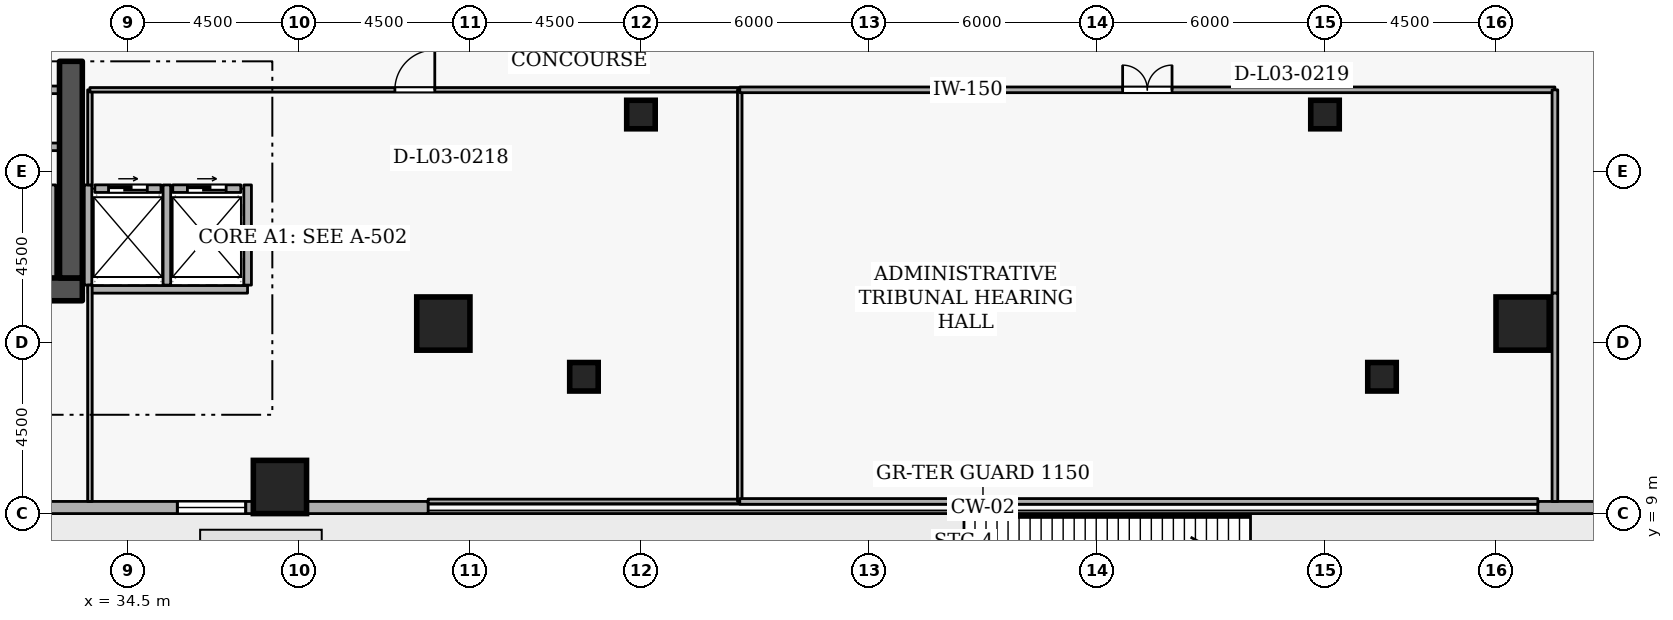
"""IFC4 building model, lengths in metres.
Left out: names, types, materials, properties, quantities, classifications, styles, units other than length and angle.
Written with IfcOpenShell. Run it as: python <this file> out.ifc"""

import sys

from ifc_helpers import new_model, si_unit, direction, frame, frame_2d, origin, origin_2d, place, context, subcontext, project, spatial, rectangle, extrude, element, fill, save


model = new_model("IFC4")
c1 = context("Model", 3, precision=1e-05, world=origin(), true_north=direction((0.0, 1.0)))
c2 = subcontext(c1, "Body", "Model", "MODEL_VIEW")
j1 = project(units=[si_unit("LENGTHUNIT", "METRE"), si_unit("PLANEANGLEUNIT", "RADIAN")], contexts=[c1])
p1 = place(None, origin())
s1 = spatial("IfcSite", under=j1, at=p1, CompositionType="ELEMENT")
p2 = place(p1, origin())
s2 = spatial("IfcBuilding", under=s1, at=p2, CompositionType="ELEMENT")
p3 = place(p2, frame((0.0, 0.0, 14.1)))
s3 = spatial("IfcBuildingStorey", under=s2, at=p3, CompositionType="ELEMENT", Elevation=14.1)
p4 = place(p3, frame((17.7, 14.9, 0.0), z_axis=(0.0, 0.0, 1.0), x_axis=(1.0, 0.0, 0.0)))
e1 = element("IfcWall", 1, at=p4, inside=s3, PredefinedType="SHEAR", context=c2, shape_type="SweptSolid", body=[
    extrude(rectangle(XDim=15.6, YDim=0.6, at=frame_2d((7.8, 0.0))), origin(), (0.0, 0.0, 1.0), 4.5),
])
p5 = place(p3, frame((33.0, 15.2, 0.0), z_axis=(0.0, 0.0, 1.0), x_axis=(0.0, 1.0, 0.0)))
e2 = element("IfcWall", 2, at=p5, inside=s3, PredefinedType="SHEAR", context=c2, shape_type="SweptSolid", body=[
    extrude(rectangle(XDim=5.7, YDim=0.6, at=frame_2d((2.85, 0.0))), origin(), (0.0, 0.0, 1.0), 4.5),
])
for number, where, z_axis, x_axis in (
    (3, (38.5, 9.7, 0.0), (0.0, 0.0, 1.0), (1.0, 0.0, 0.0)),
    (4, (42.8, 14.0, 0.0), (0.0, 0.0, 1.0), (1.0, 0.0, 0.0)),
    (5, (71.2, 14.0, 0.0), (0.0, 0.0, 1.0), (1.0, 0.0, 0.0)),
):
    element("IfcColumn", number, at=place(p3, frame(where, z_axis=z_axis, x_axis=x_axis)), inside=s3, PredefinedType="COLUMN", context=c2, shape_type="SweptSolid", body=[
        extrude(rectangle(XDim=1.4, YDim=1.4, at=origin_2d()), origin(), (0.0, 0.0, 1.0), 4.5),
    ])
for number, where, z_axis, x_axis in (
    (6, (46.5, 12.6, 0.0), (0.0, 0.0, 1.0), (1.0, 0.0, 0.0)),
    (7, (67.5, 12.6, 0.0), (0.0, 0.0, 1.0), (1.0, 0.0, 0.0)),
    (8, (48.0, 19.5, 0.0), (0.0, 0.0, 1.0), (1.0, 0.0, 0.0)),
    (9, (66.0, 19.5, 0.0), (0.0, 0.0, 1.0), (1.0, 0.0, 0.0)),
):
    element("IfcColumn", number, at=place(p3, frame(where, z_axis=z_axis, x_axis=x_axis)), inside=s3, PredefinedType="COLUMN", context=c2, shape_type="SweptSolid", body=[
        extrude(rectangle(XDim=0.75, YDim=0.75, at=origin_2d()), origin(), (0.0, 0.0, 1.0), 4.5),
    ])
p6 = place(p3, frame((3.0, 9.16, 0.0), z_axis=(0.0, 0.0, 1.0), x_axis=(1.0, 0.0, 0.0)))
e10 = element("IfcWall", 10, at=p6, inside=s3, PredefinedType="STANDARD", context=c2, shape_type="SweptSolid", body=[
    extrude(rectangle(XDim=39.4, YDim=0.32, at=frame_2d((19.7, 0.0))), origin(), (0.0, 0.0, 1.0), 3.56),
])
p7 = place(p6, frame((6.2, 0.0, 0.0)))
e11 = element("IfcOpeningElement", 11, at=p7, cuts=e10, PredefinedType="OPENING", context=c2, shape_type="SweptSolid", body=[
    extrude(rectangle(XDim=1.15, YDim=2.1, at=frame_2d((0.575, 1.05))), frame((0.0, 0.17, 0.0), z_axis=(0.0, -1.0, 0.0), x_axis=(1.0, 0.0, 0.0)), (0.0, 0.0, 1.0), 0.34),
])
p8 = place(p6, frame((3.0, 0.0, 0.78)))
e12 = element("IfcOpeningElement", 12, at=p8, cuts=e10, PredefinedType="OPENING", context=c2, shape_type="SweptSolid", body=[
    extrude(rectangle(XDim=1.8, YDim=2.15, at=frame_2d((0.9, 1.075))), frame((0.0, 0.17, 0.0), z_axis=(0.0, -1.0, 0.0), x_axis=(1.0, 0.0, 0.0)), (0.0, 0.0, 1.0), 0.34),
])
p9 = place(p6, frame((12.8, 0.0, 0.78)))
e13 = element("IfcOpeningElement", 13, at=p9, cuts=e10, PredefinedType="OPENING", context=c2, shape_type="SweptSolid", body=[
    extrude(rectangle(XDim=1.8, YDim=2.15, at=frame_2d((0.9, 1.075))), frame((0.0, 0.17, 0.0), z_axis=(0.0, -1.0, 0.0), x_axis=(1.0, 0.0, 0.0)), (0.0, 0.0, 1.0), 0.34),
])
p10 = place(p6, frame((32.8, 0.0, 0.78)))
e14 = element("IfcOpeningElement", 14, at=p10, cuts=e10, PredefinedType="OPENING", context=c2, shape_type="SweptSolid", body=[
    extrude(rectangle(XDim=1.8, YDim=2.15, at=frame_2d((0.9, 1.075))), frame((0.0, 0.17, 0.0), z_axis=(0.0, -1.0, 0.0), x_axis=(1.0, 0.0, 0.0)), (0.0, 0.0, 1.0), 0.34),
])
p11 = place(p3, frame((71.6, 9.16, 0.0), z_axis=(0.0, 0.0, 1.0), x_axis=(1.0, 0.0, 0.0)))
e15 = element("IfcWall", 15, at=p11, inside=s3, PredefinedType="STANDARD", context=c2, shape_type="SweptSolid", body=[
    extrude(rectangle(XDim=39.4, YDim=0.32, at=frame_2d((19.7, 0.0))), origin(), (0.0, 0.0, 1.0), 3.56),
])
p12 = place(p11, frame((13.5, 0.0, 0.0)))
e16 = element("IfcOpeningElement", 16, at=p12, cuts=e15, PredefinedType="OPENING", context=c2, shape_type="SweptSolid", body=[
    extrude(rectangle(XDim=1.15, YDim=2.1, at=frame_2d((0.575, 1.05))), frame((0.0, 0.17, 0.0), z_axis=(0.0, -1.0, 0.0), x_axis=(1.0, 0.0, 0.0)), (0.0, 0.0, 1.0), 0.34),
])
p13 = place(p11, frame((22.8, 0.0, 0.78)))
e17 = element("IfcOpeningElement", 17, at=p13, cuts=e15, PredefinedType="OPENING", context=c2, shape_type="SweptSolid", body=[
    extrude(rectangle(XDim=1.8, YDim=2.15, at=frame_2d((0.9, 1.075))), frame((0.0, 0.17, 0.0), z_axis=(0.0, -1.0, 0.0), x_axis=(1.0, 0.0, 0.0)), (0.0, 0.0, 1.0), 0.34),
])
p14 = place(p11, frame((32.8, 0.0, 0.78)))
e18 = element("IfcOpeningElement", 18, at=p14, cuts=e15, PredefinedType="OPENING", context=c2, shape_type="SweptSolid", body=[
    extrude(rectangle(XDim=1.8, YDim=2.15, at=frame_2d((0.9, 1.075))), frame((0.0, 0.17, 0.0), z_axis=(0.0, -1.0, 0.0), x_axis=(1.0, 0.0, 0.0)), (0.0, 0.0, 1.0), 0.34),
])
p15 = place(p3, frame((33.63, 17.55, 0.0), z_axis=(0.0, 0.0, 1.0), x_axis=(1.0, 0.0, 0.0)))
e19 = element("IfcWall", 19, at=p15, inside=s3, PredefinedType="STANDARD", context=c2, shape_type="SweptSolid", body=[
    extrude(rectangle(XDim=1.74, YDim=0.2, at=frame_2d((0.87, 0.0))), origin(), (0.0, 0.0, 1.0), 4.16),
])
p16 = place(p15, frame((0.36, 0.0, 0.0)))
e20 = element("IfcOpeningElement", 20, at=p16, cuts=e19, PredefinedType="OPENING", context=c2, shape_type="SweptSolid", body=[
    extrude(rectangle(XDim=1.02, YDim=2.06, at=frame_2d((0.51, 1.03))), frame((0.0, 0.11, 0.0), z_axis=(0.0, -1.0, 0.0), x_axis=(1.0, 0.0, 0.0)), (0.0, 0.0, 1.0), 0.22),
])
p17 = place(p3, frame((35.68, 17.55, 0.0), z_axis=(0.0, 0.0, 1.0), x_axis=(1.0, 0.0, 0.0)))
e21 = element("IfcWall", 21, at=p17, inside=s3, PredefinedType="STANDARD", context=c2, shape_type="SweptSolid", body=[
    extrude(rectangle(XDim=1.79, YDim=0.2, at=frame_2d((0.895, 0.0))), origin(), (0.0, 0.0, 1.0), 4.16),
])
p18 = place(p17, frame((0.385, 0.0, 0.0)))
e22 = element("IfcOpeningElement", 22, at=p18, cuts=e21, PredefinedType="OPENING", context=c2, shape_type="SweptSolid", body=[
    extrude(rectangle(XDim=1.02, YDim=2.06, at=frame_2d((0.51, 1.03))), frame((0.0, 0.11, 0.0), z_axis=(0.0, -1.0, 0.0), x_axis=(1.0, 0.0, 0.0)), (0.0, 0.0, 1.0), 0.22),
])
p19 = place(p3, frame((32.5, 15.212, 0.0), z_axis=(0.0, 0.0, 1.0), x_axis=(0.0, 1.0, 0.0)))
e23 = element("IfcWall", 23, at=p19, inside=s3, PredefinedType="STANDARD", context=c2, shape_type="SweptSolid", body=[
    extrude(rectangle(XDim=2.436, YDim=0.2, at=frame_2d((1.218, 0.0))), origin(), (0.0, 0.0, 1.0), 4.16),
])
p20 = place(p3, frame((33.452, 14.9, 0.0), z_axis=(0.0, 0.0, 1.0), x_axis=(1.0, 0.0, 0.0)))
e24 = element("IfcWall", 24, at=p20, inside=s3, PredefinedType="STANDARD", context=c2, shape_type="SweptSolid", body=[
    extrude(rectangle(XDim=4.196, YDim=0.2, at=frame_2d((2.098, 0.0))), origin(), (0.0, 0.0, 1.0), 4.16),
])
for number, where, z_axis, x_axis in (
    (25, (35.525, 15.012, 0.0), (0.0, 0.0, 1.0), (0.0, 1.0, 0.0)),
    (26, (33.45, 15.012, 0.0), (0.0, 0.0, 1.0), (0.0, 1.0, 0.0)),
    (27, (37.65, 15.012, 0.0), (0.0, 0.0, 1.0), (0.0, 1.0, 0.0)),
):
    element("IfcWall", number, at=place(p3, frame(where, z_axis=z_axis, x_axis=x_axis)), inside=s3, PredefinedType="STANDARD", context=c2, shape_type="SweptSolid", body=[
        extrude(rectangle(XDim=2.636, YDim=0.2, at=frame_2d((1.318, 0.0))), origin(), (0.0, 0.0, 1.0), 4.16),
    ])
p21 = place(p3, frame((32.7, 18.65, 0.0), z_axis=(0.0, 0.0, 1.0), x_axis=(-1.0, 0.0, 0.0)))
e28 = element("IfcWall", 28, at=p21, inside=s3, PredefinedType="STANDARD", context=c2, shape_type="SweptSolid", body=[
    extrude(rectangle(XDim=2.25, YDim=0.2, at=frame_2d((1.125, 0.0))), origin(), (0.0, 0.0, 1.0), 4.16),
])
p22 = place(p3, frame((30.45, 20.15, 0.0), z_axis=(0.0, 0.0, 1.0), x_axis=(1.0, 0.0, 0.0)))
e29 = element("IfcWall", 29, at=p22, inside=s3, PredefinedType="STANDARD", context=c2, shape_type="SweptSolid", body=[
    extrude(rectangle(XDim=2.25, YDim=0.2, at=frame_2d((1.125, 0.0))), origin(), (0.0, 0.0, 1.0), 4.16),
])
p23 = place(p22, frame((0.55, 0.0, 0.0)))
e30 = element("IfcOpeningElement", 30, at=p23, cuts=e29, PredefinedType="OPENING", context=c2, shape_type="SweptSolid", body=[
    extrude(rectangle(XDim=1.15, YDim=2.1, at=frame_2d((0.575, 1.05))), frame((0.0, 0.11, 0.0), z_axis=(0.0, -1.0, 0.0), x_axis=(1.0, 0.0, 0.0)), (0.0, 0.0, 1.0), 0.22),
])
p24 = place(p3, frame((50.6, 9.32, 0.0), z_axis=(0.0, 0.0, 1.0), x_axis=(-1.0, 0.0, 0.0)))
e31 = element("IfcWall", 31, at=p24, inside=s3, PredefinedType="PARTITIONING", context=c2, shape_type="SweptSolid", body=[
    extrude(rectangle(XDim=8.2, YDim=0.12, at=frame_2d((4.1, 0.0))), origin(), (0.0, 0.0, 1.0), 4.16),
])
p25 = place(p3, frame((33.5, 9.32, 0.0), z_axis=(0.0, 0.0, 1.0), x_axis=(0.0, 1.0, 0.0)))
e32 = element("IfcWall", 32, at=p25, inside=s3, PredefinedType="PARTITIONING", context=c2, shape_type="SweptSolid", body=[
    extrude(rectangle(XDim=5.692, YDim=0.12, at=frame_2d((2.846, 0.0))), origin(), (0.0, 0.0, 1.0), 4.16),
])
p26 = place(p3, frame((33.5, 17.648, 0.0), z_axis=(0.0, 0.0, 1.0), x_axis=(0.0, 1.0, 0.0)))
e33 = element("IfcWall", 33, at=p26, inside=s3, PredefinedType="PARTITIONING", context=c2, shape_type="SweptSolid", body=[
    extrude(rectangle(XDim=2.502, YDim=0.12, at=frame_2d((1.251, 0.0))), origin(), (0.0, 0.0, 1.0), 4.16),
])
p27 = place(p3, frame((33.5, 20.15, 0.0), z_axis=(0.0, 0.0, 1.0), x_axis=(1.0, 0.0, 0.0)))
e34 = element("IfcWall", 34, at=p27, inside=s3, PredefinedType="PARTITIONING", context=c2, shape_type="SweptSolid", body=[
    extrude(rectangle(XDim=17.1, YDim=0.12, at=frame_2d((8.55, 0.0))), origin(), (0.0, 0.0, 1.0), 4.16),
])
p28 = place(p27, frame((8.025, 0.0, 0.0)))
e35 = element("IfcOpeningElement", 35, at=p28, cuts=e34, PredefinedType="OPENING", context=c2, shape_type="SweptSolid", body=[
    extrude(rectangle(XDim=1.05, YDim=2.1, at=frame_2d((0.525, 1.05))), frame((0.0, 0.07, 0.0), z_axis=(0.0, -1.0, 0.0), x_axis=(1.0, 0.0, 0.0)), (0.0, 0.0, 1.0), 0.14),
])
p29 = place(p3, frame((50.6, 20.15, 0.0), z_axis=(0.0, 0.0, 1.0), x_axis=(0.0, -1.0, 0.0)))
e36 = element("IfcWall", 36, at=p29, inside=s3, PredefinedType="PARTITIONING", context=c2, shape_type="SweptSolid", body=[
    extrude(rectangle(XDim=10.83, YDim=0.12, at=frame_2d((5.415, 0.0))), origin(), (0.0, 0.0, 1.0), 4.16),
])
p30 = place(p3, frame((71.6, 9.32, 0.0), z_axis=(0.0, 0.0, 1.0), x_axis=(-1.0, 0.0, 0.0)))
e37 = element("IfcWall", 37, at=p30, inside=s3, PredefinedType="PARTITIONING", context=c2, shape_type="SweptSolid", body=[
    extrude(rectangle(XDim=21.0, YDim=0.15, at=frame_2d((10.5, 0.0))), origin(), (0.0, 0.0, 1.0), 4.16),
])
p31 = place(p3, frame((50.6, 20.15, 0.0), z_axis=(0.0, 0.0, 1.0), x_axis=(1.0, 0.0, 0.0)))
e38 = element("IfcWall", 38, at=p31, inside=s3, PredefinedType="PARTITIONING", context=c2, shape_type="SweptSolid", body=[
    extrude(rectangle(XDim=21.45, YDim=0.15, at=frame_2d((10.725, 0.0))), origin(), (0.0, 0.0, 1.0), 4.16),
])
p32 = place(p31, frame((10.075, 0.0, 0.0)))
e39 = element("IfcOpeningElement", 39, at=p32, cuts=e38, PredefinedType="OPENING", context=c2, shape_type="SweptSolid", body=[
    extrude(rectangle(XDim=1.3, YDim=2.12, at=frame_2d((0.65, 1.06))), frame((0.0, 0.085, 0.0), z_axis=(0.0, -1.0, 0.0), x_axis=(1.0, 0.0, 0.0)), (0.0, 0.0, 1.0), 0.17),
])
p33 = place(p3, frame((72.05, 20.15, 0.0), z_axis=(0.0, 0.0, 1.0), x_axis=(0.0, -1.0, 0.0)))
e40 = element("IfcWall", 40, at=p33, inside=s3, PredefinedType="PARTITIONING", context=c2, shape_type="SweptSolid", body=[
    extrude(rectangle(XDim=5.35, YDim=0.15, at=frame_2d((2.675, 0.0))), origin(), (0.0, 0.0, 1.0), 4.16),
])
p34 = place(p3, frame((72.05, 14.8, 0.0), z_axis=(0.0, 0.0, 1.0), x_axis=(0.0, -1.0, 0.0)))
e41 = element("IfcWall", 41, at=p34, inside=s3, PredefinedType="PARTITIONING", context=c2, shape_type="SweptSolid", body=[
    extrude(rectangle(XDim=5.48, YDim=0.15, at=frame_2d((2.74, 0.0))), origin(), (0.0, 0.0, 1.0), 4.16),
])
p35 = place(p10, origin())
e42 = element("IfcWindow", 42, at=p35, inside=s3, PartitioningType="SINGLE_PANEL", PredefinedType="WINDOW", context=c2, shape_type="SweptSolid", body=[
    extrude(rectangle(XDim=1.8, YDim=2.15, at=frame_2d((0.9, 1.075))), frame((0.0, 0.03, 0.0), z_axis=(0.0, -1.0, 0.0), x_axis=(1.0, 0.0, 0.0)), (0.0, 0.0, 1.0), 0.06),
])
fill(e14, e42)
p36 = place(p16, origin())
e43 = element("IfcDoor", 43, at=p36, inside=s3, OperationType="SLIDING_TO_LEFT", PredefinedType="DOOR", context=c2, shape_type="SweptSolid", body=[
    extrude(rectangle(XDim=1.02, YDim=2.06, at=frame_2d((0.51, 1.03))), frame((0.0, 0.025, 0.0), z_axis=(0.0, -1.0, 0.0), x_axis=(1.0, 0.0, 0.0)), (0.0, 0.0, 1.0), 0.05),
])
fill(e20, e43)
p37 = place(p18, origin())
e44 = element("IfcDoor", 44, at=p37, inside=s3, OperationType="SLIDING_TO_LEFT", PredefinedType="DOOR", context=c2, shape_type="SweptSolid", body=[
    extrude(rectangle(XDim=1.02, YDim=2.06, at=frame_2d((0.51, 1.03))), frame((0.0, 0.025, 0.0), z_axis=(0.0, -1.0, 0.0), x_axis=(1.0, 0.0, 0.0)), (0.0, 0.0, 1.0), 0.05),
])
fill(e22, e44)
p38 = place(p28, origin())
e45 = element("IfcDoor", 45, at=p38, inside=s3, OperationType="SINGLE_SWING_RIGHT", PredefinedType="DOOR", context=c2, shape_type="SweptSolid", body=[
    extrude(rectangle(XDim=1.05, YDim=2.1, at=frame_2d((0.525, 1.05))), frame((0.0, 0.025, 0.0), z_axis=(0.0, -1.0, 0.0), x_axis=(1.0, 0.0, 0.0)), (0.0, 0.0, 1.0), 0.05),
])
fill(e35, e45)
p39 = place(p32, origin())
e46 = element("IfcDoor", 46, at=p39, inside=s3, OperationType="DOUBLE_DOOR_SINGLE_SWING", PredefinedType="DOOR", context=c2, shape_type="SweptSolid", body=[
    extrude(rectangle(XDim=1.3, YDim=2.12, at=frame_2d((0.65, 1.06))), frame((0.0, 0.025, 0.0), z_axis=(0.0, -1.0, 0.0), x_axis=(1.0, 0.0, 0.0)), (0.0, 0.0, 1.0), 0.05),
])
fill(e39, e46)
save(model, sys.argv[1])
